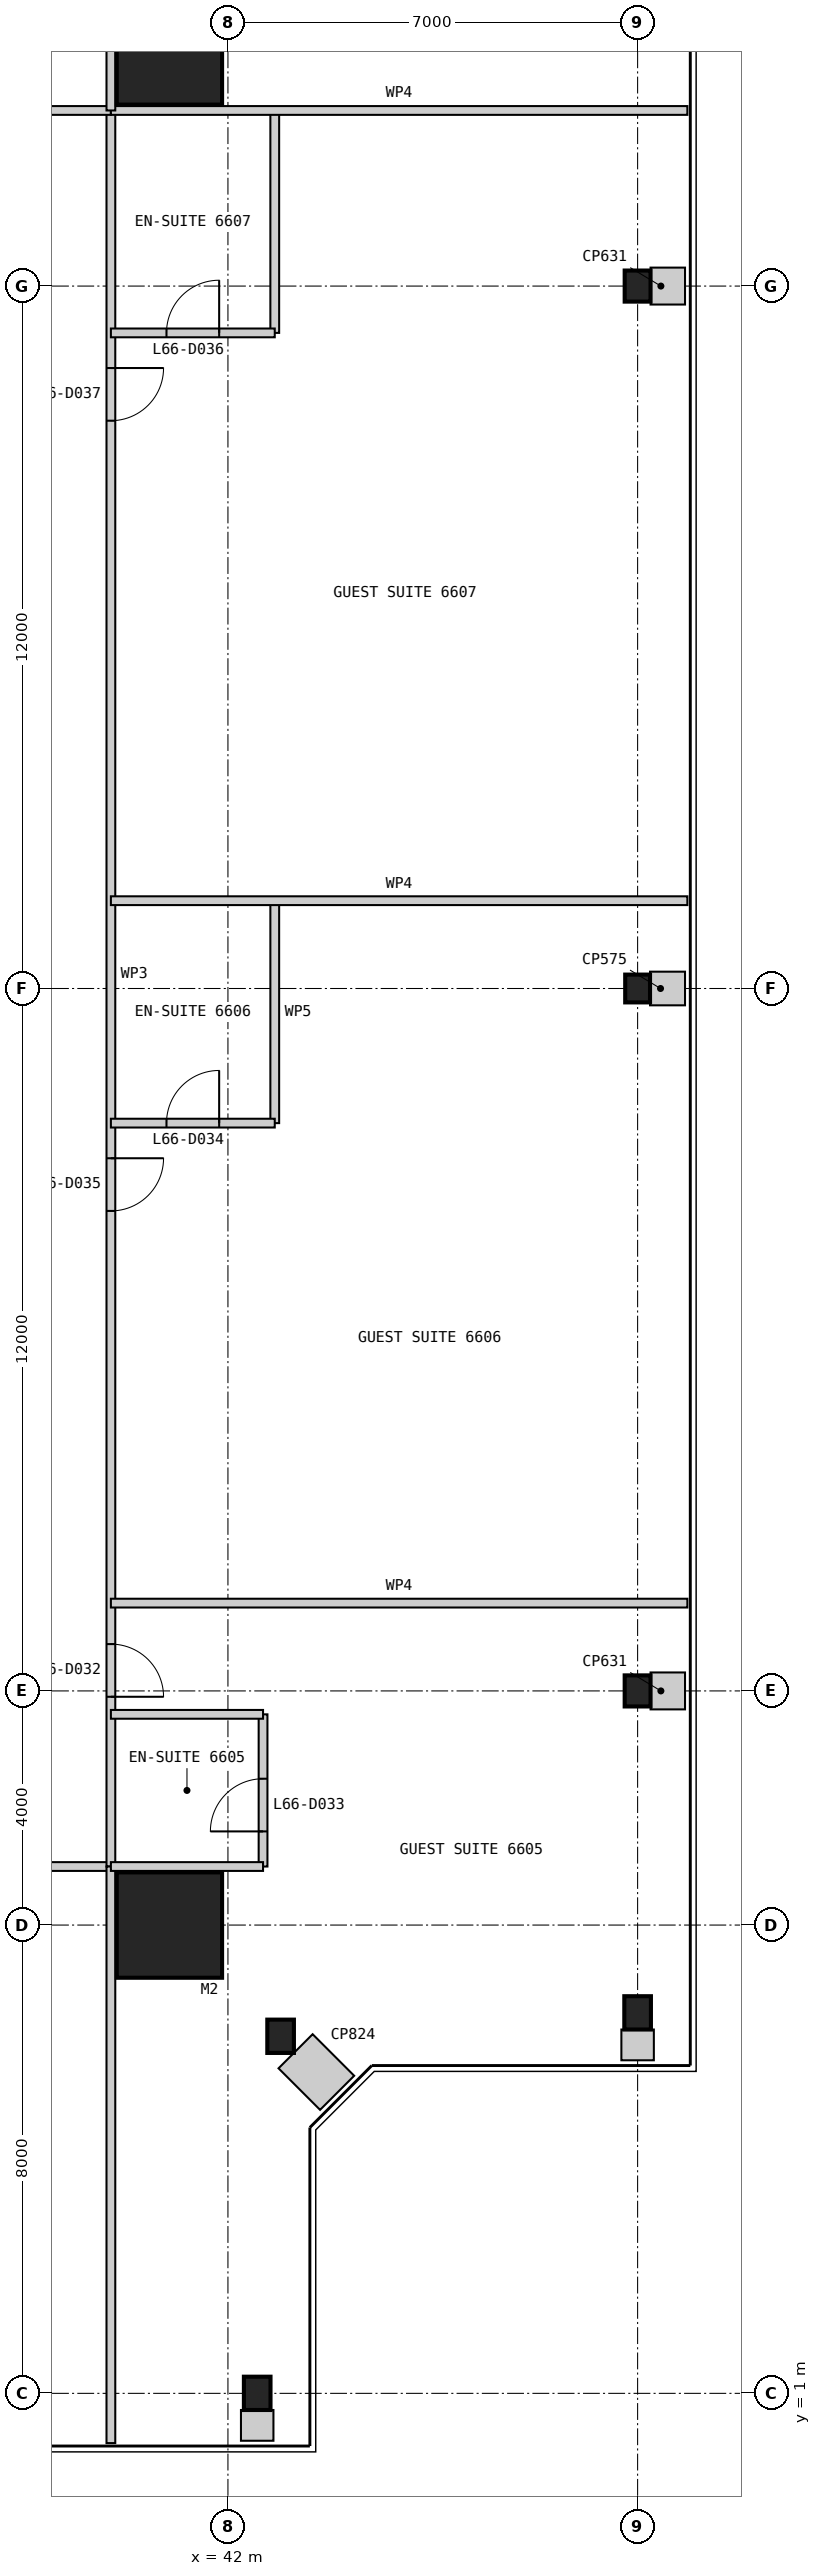
"""IFC4 building model, lengths in metres.
Left out: names, types, materials, properties, quantities, classifications, styles, units other than length and angle.
Written with IfcOpenShell. Run it as: python <this file> out.ifc"""

import sys

from ifc_helpers import new_model, si_unit, direction, frame, frame_2d, origin, origin_2d, place, context, subcontext, project, spatial, rectangle, i_section, extrude, element, fill, save


model = new_model("IFC4")
c1 = context("Model", 3, precision=1e-05, world=origin(), true_north=direction((0.0, 1.0)))
c2 = subcontext(c1, "Body", "Model", "MODEL_VIEW")
j1 = project(units=[si_unit("LENGTHUNIT", "METRE"), si_unit("PLANEANGLEUNIT", "RADIAN")], contexts=[c1])
p1 = place(None, origin())
s1 = spatial("IfcSite", under=j1, at=p1, CompositionType="ELEMENT")
p2 = place(p1, origin())
s2 = spatial("IfcBuilding", under=s1, at=p2, CompositionType="ELEMENT")
p3 = place(p2, frame((0.0, 0.0, 276.4)))
s3 = spatial("IfcBuildingStorey", under=s2, at=p3, CompositionType="ELEMENT", Elevation=276.4)
for number, where, z_axis, x_axis in (
    (1, (41.0, 9.0, 0.0), (0.0, 0.0, 1.0), (1.0, 0.0, 0.0)),
    (2, (41.0, 41.0, 0.0), (0.0, 0.0, 1.0), (1.0, 0.0, 0.0)),
):
    element("IfcColumn", number, at=place(p3, frame(where, z_axis=z_axis, x_axis=x_axis)), inside=s3, PredefinedType="COLUMN", context=c2, shape_type="SweptSolid", body=[
        extrude(rectangle(XDim=1.8, YDim=1.8, at=origin_2d()), origin(), (0.0, 0.0, 1.0), 3.4),
    ])
for number, where, z_axis, x_axis in (
    (3, (42.5, 1.0, 0.0), (0.0, 0.0, 1.0), (1.0, 0.0, 0.0)),
    (4, (42.9, 7.1, 0.0), (0.0, 0.0, 1.0), (1.0, 0.0, 0.0)),
    (5, (49.0, 7.5, 0.0), (0.0, 0.0, 1.0), (1.0, 0.0, 0.0)),
):
    element("IfcColumn", number, at=place(p3, frame(where, z_axis=z_axis, x_axis=x_axis)), inside=s3, PredefinedType="COLUMN", context=c2, shape_type="SweptSolid", body=[
        extrude(i_section(OverallWidth=0.455, OverallDepth=0.569, WebThickness=0.078, FlangeThickness=0.125, at=origin_2d()), origin(), (0.0, 0.0, 1.0), 3.4),
    ])
p4 = place(p3, frame((49.0, 13.0, 0.0), z_axis=(0.0, 0.0, 1.0), x_axis=(1.0, 0.0, 0.0)))
e6 = element("IfcColumn", 6, at=p4, inside=s3, PredefinedType="COLUMN", context=c2, shape_type="SweptSolid", body=[
    extrude(i_section(OverallWidth=0.442, OverallDepth=0.531, WebThickness=0.066, FlangeThickness=0.106, at=origin_2d()), origin(), (0.0, 0.0, 1.0), 3.4),
])
p5 = place(p3, frame((49.0, 25.0, 0.0), z_axis=(0.0, 0.0, 1.0), x_axis=(1.0, 0.0, 0.0)))
e7 = element("IfcColumn", 7, at=p5, inside=s3, PredefinedType="COLUMN", context=c2, shape_type="SweptSolid", body=[
    extrude(i_section(OverallWidth=0.424, OverallDepth=0.475, WebThickness=0.048, FlangeThickness=0.077, at=origin_2d()), origin(), (0.0, 0.0, 1.0), 3.4),
])
p6 = place(p3, frame((49.0, 37.0, 0.0), z_axis=(0.0, 0.0, 1.0), x_axis=(1.0, 0.0, 0.0)))
e8 = element("IfcColumn", 8, at=p6, inside=s3, PredefinedType="COLUMN", context=c2, shape_type="SweptSolid", body=[
    extrude(i_section(OverallWidth=0.442, OverallDepth=0.531, WebThickness=0.066, FlangeThickness=0.106, at=origin_2d()), origin(), (0.0, 0.0, 1.0), 3.4),
])
p7 = place(p3, frame((10.0, 10.0, 0.0), z_axis=(0.0, 0.0, 1.0), x_axis=(1.0, 0.0, 0.0)))
e9 = element("IfcWall", 9, at=p7, inside=s3, PredefinedType="PARTITIONING", context=c2, shape_type="SweptSolid", body=[
    extrude(rectangle(XDim=30.0, YDim=0.15, at=frame_2d((15.0, 0.0))), origin(), (0.0, 0.0, 1.0), 3.25),
])
p8 = place(p7, frame((2.9, 0.0, 0.0)))
e10 = element("IfcOpeningElement", 10, at=p8, cuts=e9, PredefinedType="OPENING", context=c2, shape_type="SweptSolid", body=[
    extrude(rectangle(XDim=0.9, YDim=2.1, at=frame_2d((0.45, 1.05))), frame((0.0, 0.085, 0.0), z_axis=(0.0, -1.0, 0.0), x_axis=(1.0, 0.0, 0.0)), (0.0, 0.0, 1.0), 0.17),
])
p9 = place(p7, frame((11.2, 0.0, 0.0)))
e11 = element("IfcOpeningElement", 11, at=p9, cuts=e9, PredefinedType="OPENING", context=c2, shape_type="SweptSolid", body=[
    extrude(rectangle(XDim=0.9, YDim=2.1, at=frame_2d((0.45, 1.05))), frame((0.0, 0.085, 0.0), z_axis=(0.0, -1.0, 0.0), x_axis=(1.0, 0.0, 0.0)), (0.0, 0.0, 1.0), 0.17),
])
p10 = place(p7, frame((17.6, 0.0, 0.0)))
e12 = element("IfcOpeningElement", 12, at=p10, cuts=e9, PredefinedType="OPENING", context=c2, shape_type="SweptSolid", body=[
    extrude(rectangle(XDim=0.9, YDim=2.1, at=frame_2d((0.45, 1.05))), frame((0.0, 0.085, 0.0), z_axis=(0.0, -1.0, 0.0), x_axis=(1.0, 0.0, 0.0)), (0.0, 0.0, 1.0), 0.17),
])
p11 = place(p7, frame((26.3, 0.0, 0.0)))
e13 = element("IfcOpeningElement", 13, at=p11, cuts=e9, PredefinedType="OPENING", context=c2, shape_type="SweptSolid", body=[
    extrude(rectangle(XDim=1.0, YDim=2.1, at=frame_2d((0.5, 1.05))), frame((0.0, 0.085, 0.0), z_axis=(0.0, -1.0, 0.0), x_axis=(1.0, 0.0, 0.0)), (0.0, 0.0, 1.0), 0.17),
])
p12 = place(p3, frame((40.0, 10.0, 0.0), z_axis=(0.0, 0.0, 1.0), x_axis=(0.0, 1.0, 0.0)))
e14 = element("IfcWall", 14, at=p12, inside=s3, PredefinedType="PARTITIONING", context=c2, shape_type="SweptSolid", body=[
    extrude(rectangle(XDim=30.0, YDim=0.15, at=frame_2d((15.0, 0.0))), origin(), (0.0, 0.0, 1.0), 2.638),
])
p13 = place(p12, frame((2.9, 0.0, 0.0)))
e15 = element("IfcOpeningElement", 15, at=p13, cuts=e14, PredefinedType="OPENING", context=c2, shape_type="SweptSolid", body=[
    extrude(rectangle(XDim=0.9, YDim=2.1, at=frame_2d((0.45, 1.05))), frame((0.0, 0.085, 0.0), z_axis=(0.0, -1.0, 0.0), x_axis=(1.0, 0.0, 0.0)), (0.0, 0.0, 1.0), 0.17),
])
p14 = place(p12, frame((11.2, 0.0, 0.0)))
e16 = element("IfcOpeningElement", 16, at=p14, cuts=e14, PredefinedType="OPENING", context=c2, shape_type="SweptSolid", body=[
    extrude(rectangle(XDim=0.9, YDim=2.1, at=frame_2d((0.45, 1.05))), frame((0.0, 0.085, 0.0), z_axis=(0.0, -1.0, 0.0), x_axis=(1.0, 0.0, 0.0)), (0.0, 0.0, 1.0), 0.17),
])
p15 = place(p12, frame((24.7, 0.0, 0.0)))
e17 = element("IfcOpeningElement", 17, at=p15, cuts=e14, PredefinedType="OPENING", context=c2, shape_type="SweptSolid", body=[
    extrude(rectangle(XDim=0.9, YDim=2.1, at=frame_2d((0.45, 1.05))), frame((0.0, 0.085, 0.0), z_axis=(0.0, -1.0, 0.0), x_axis=(1.0, 0.0, 0.0)), (0.0, 0.0, 1.0), 0.17),
])
p16 = place(p3, frame((40.0, 0.15, 0.0), z_axis=(0.0, 0.0, 1.0), x_axis=(0.0, 1.0, 0.0)))
e18 = element("IfcWall", 18, at=p16, inside=s3, PredefinedType="PARTITIONING", context=c2, shape_type="SweptSolid", body=[
    extrude(rectangle(XDim=9.85, YDim=0.15, at=frame_2d((4.925, 0.0))), origin(), (0.0, 0.0, 1.0), 3.25),
])
p17 = place(p3, frame((42.6, 10.0, 0.0), z_axis=(0.0, 0.0, 1.0), x_axis=(0.0, 1.0, 0.0)))
e19 = element("IfcWall", 19, at=p17, inside=s3, PredefinedType="PARTITIONING", context=c2, shape_type="SweptSolid", body=[
    extrude(rectangle(XDim=2.6, YDim=0.15, at=frame_2d((1.3, 0.0))), origin(), (0.0, 0.0, 1.0), 3.25),
])
p18 = place(p17, frame((0.6, 0.0, 0.0)))
e20 = element("IfcOpeningElement", 20, at=p18, cuts=e19, PredefinedType="OPENING", context=c2, shape_type="SweptSolid", body=[
    extrude(rectangle(XDim=0.9, YDim=2.1, at=frame_2d((0.45, 1.05))), frame((0.0, 0.085, 0.0), z_axis=(0.0, -1.0, 0.0), x_axis=(1.0, 0.0, 0.0)), (0.0, 0.0, 1.0), 0.17),
])
for number, where, z_axis, x_axis in (
    (21, (42.6, 10.0, 0.0), (0.0, 0.0, 1.0), (-1.0, 0.0, 0.0)),
    (22, (42.6, 12.6, 0.0), (0.0, 0.0, 1.0), (-1.0, 0.0, 0.0)),
):
    element("IfcWall", number, at=place(p3, frame(where, z_axis=z_axis, x_axis=x_axis)), inside=s3, PredefinedType="PARTITIONING", context=c2, shape_type="SweptSolid", body=[
        extrude(rectangle(XDim=2.6, YDim=0.15, at=frame_2d((1.3, 0.0))), origin(), (0.0, 0.0, 1.0), 3.25),
    ])
p19 = place(p3, frame((49.85, 14.5, 0.0), z_axis=(0.0, 0.0, 1.0), x_axis=(-1.0, 0.0, 0.0)))
e23 = element("IfcWall", 23, at=p19, inside=s3, PredefinedType="PARTITIONING", context=c2, shape_type="SweptSolid", body=[
    extrude(rectangle(XDim=9.85, YDim=0.15, at=frame_2d((4.925, 0.0))), origin(), (0.0, 0.0, 1.0), 3.25),
])
p20 = place(p3, frame((42.8, 22.7, 0.0), z_axis=(0.0, 0.0, 1.0), x_axis=(0.0, 1.0, 0.0)))
e24 = element("IfcWall", 24, at=p20, inside=s3, PredefinedType="PARTITIONING", context=c2, shape_type="SweptSolid", body=[
    extrude(rectangle(XDim=3.8, YDim=0.15, at=frame_2d((1.9, 0.0))), origin(), (0.0, 0.0, 1.0), 3.25),
])
p21 = place(p3, frame((42.8, 22.7, 0.0), z_axis=(0.0, 0.0, 1.0), x_axis=(-1.0, 0.0, 0.0)))
e25 = element("IfcWall", 25, at=p21, inside=s3, PredefinedType="PARTITIONING", context=c2, shape_type="SweptSolid", body=[
    extrude(rectangle(XDim=2.8, YDim=0.15, at=frame_2d((1.4, 0.0))), origin(), (0.0, 0.0, 1.0), 3.25),
])
p22 = place(p21, frame((0.95, 0.0, 0.0)))
e26 = element("IfcOpeningElement", 26, at=p22, cuts=e25, PredefinedType="OPENING", context=c2, shape_type="SweptSolid", body=[
    extrude(rectangle(XDim=0.9, YDim=2.1, at=frame_2d((0.45, 1.05))), frame((0.0, 0.085, 0.0), z_axis=(0.0, -1.0, 0.0), x_axis=(1.0, 0.0, 0.0)), (0.0, 0.0, 1.0), 0.17),
])
p23 = place(p3, frame((49.85, 26.5, 0.0), z_axis=(0.0, 0.0, 1.0), x_axis=(-1.0, 0.0, 0.0)))
e27 = element("IfcWall", 27, at=p23, inside=s3, PredefinedType="PARTITIONING", context=c2, shape_type="SweptSolid", body=[
    extrude(rectangle(XDim=9.85, YDim=0.15, at=frame_2d((4.925, 0.0))), origin(), (0.0, 0.0, 1.0), 3.25),
])
p24 = place(p3, frame((42.8, 36.2, 0.0), z_axis=(0.0, 0.0, 1.0), x_axis=(0.0, 1.0, 0.0)))
e28 = element("IfcWall", 28, at=p24, inside=s3, PredefinedType="PARTITIONING", context=c2, shape_type="SweptSolid", body=[
    extrude(rectangle(XDim=3.8, YDim=0.15, at=frame_2d((1.9, 0.0))), origin(), (0.0, 0.0, 1.0), 3.25),
])
p25 = place(p3, frame((42.8, 36.2, 0.0), z_axis=(0.0, 0.0, 1.0), x_axis=(-1.0, 0.0, 0.0)))
e29 = element("IfcWall", 29, at=p25, inside=s3, PredefinedType="PARTITIONING", context=c2, shape_type="SweptSolid", body=[
    extrude(rectangle(XDim=2.8, YDim=0.15, at=frame_2d((1.4, 0.0))), origin(), (0.0, 0.0, 1.0), 3.25),
])
p26 = place(p25, frame((0.95, 0.0, 0.0)))
e30 = element("IfcOpeningElement", 30, at=p26, cuts=e29, PredefinedType="OPENING", context=c2, shape_type="SweptSolid", body=[
    extrude(rectangle(XDim=0.9, YDim=2.1, at=frame_2d((0.45, 1.05))), frame((0.0, 0.085, 0.0), z_axis=(0.0, -1.0, 0.0), x_axis=(1.0, 0.0, 0.0)), (0.0, 0.0, 1.0), 0.17),
])
p27 = place(p3, frame((40.0, 40.0, 0.0), z_axis=(0.0, 0.0, 1.0), x_axis=(-1.0, 0.0, 0.0)))
e31 = element("IfcWall", 31, at=p27, inside=s3, PredefinedType="PARTITIONING", context=c2, shape_type="SweptSolid", body=[
    extrude(rectangle(XDim=30.0, YDim=0.15, at=frame_2d((15.0, 0.0))), origin(), (0.0, 0.0, 1.0), 3.25),
])
p28 = place(p27, frame((2.9, 0.0, 0.0)))
e32 = element("IfcOpeningElement", 32, at=p28, cuts=e31, PredefinedType="OPENING", context=c2, shape_type="SweptSolid", body=[
    extrude(rectangle(XDim=0.9, YDim=2.1, at=frame_2d((0.45, 1.05))), frame((0.0, 0.085, 0.0), z_axis=(0.0, -1.0, 0.0), x_axis=(1.0, 0.0, 0.0)), (0.0, 0.0, 1.0), 0.17),
])
p29 = place(p27, frame((11.2, 0.0, 0.0)))
e33 = element("IfcOpeningElement", 33, at=p29, cuts=e31, PredefinedType="OPENING", context=c2, shape_type="SweptSolid", body=[
    extrude(rectangle(XDim=0.9, YDim=2.1, at=frame_2d((0.45, 1.05))), frame((0.0, 0.085, 0.0), z_axis=(0.0, -1.0, 0.0), x_axis=(1.0, 0.0, 0.0)), (0.0, 0.0, 1.0), 0.17),
])
p30 = place(p27, frame((24.7, 0.0, 0.0)))
e34 = element("IfcOpeningElement", 34, at=p30, cuts=e31, PredefinedType="OPENING", context=c2, shape_type="SweptSolid", body=[
    extrude(rectangle(XDim=0.9, YDim=2.1, at=frame_2d((0.45, 1.05))), frame((0.0, 0.085, 0.0), z_axis=(0.0, -1.0, 0.0), x_axis=(1.0, 0.0, 0.0)), (0.0, 0.0, 1.0), 0.17),
])
p31 = place(p3, frame((49.85, 40.0, 0.0), z_axis=(0.0, 0.0, 1.0), x_axis=(-1.0, 0.0, 0.0)))
e35 = element("IfcWall", 35, at=p31, inside=s3, PredefinedType="PARTITIONING", context=c2, shape_type="SweptSolid", body=[
    extrude(rectangle(XDim=9.85, YDim=0.15, at=frame_2d((4.925, 0.0))), origin(), (0.0, 0.0, 1.0), 3.25),
])
p32 = place(p3, frame((40.0, 42.6, 0.0), z_axis=(0.0, 0.0, 1.0), x_axis=(0.0, -1.0, 0.0)))
e36 = element("IfcWall", 36, at=p32, inside=s3, PredefinedType="PARTITIONING", context=c2, shape_type="SweptSolid", body=[
    extrude(rectangle(XDim=2.6, YDim=0.15, at=frame_2d((1.3, 0.0))), origin(), (0.0, 0.0, 1.0), 3.25),
])
p33 = place(p3, frame((42.5, 0.19, 0.0), z_axis=(0.0, 0.0, 1.0), x_axis=(0.0, 1.0, 0.0)))
e37 = element("IfcWall", 37, at=p33, inside=s3, PredefinedType="PARTITIONING", context=c2, shape_type="SweptSolid", body=[
    extrude(rectangle(XDim=0.526, YDim=0.555, at=frame_2d((0.263, 0.0))), origin(), (0.0, 0.0, 1.0), 3.25),
])
p34 = place(p3, frame((43.866, 6.134, 0.0), z_axis=(0.0, 0.0, 1.0), x_axis=(-0.707106781187, 0.707106781187, 0.0)))
e38 = element("IfcWall", 38, at=p34, inside=s3, PredefinedType="PARTITIONING", context=c2, shape_type="SweptSolid", body=[
    extrude(rectangle(XDim=1.004, YDim=0.824, at=frame_2d((0.502, 0.0))), origin(), (0.0, 0.0, 1.0), 3.25),
])
p35 = place(p3, frame((49.0, 6.69, 0.0), z_axis=(0.0, 0.0, 1.0), x_axis=(0.0, 1.0, 0.0)))
e39 = element("IfcWall", 39, at=p35, inside=s3, PredefinedType="PARTITIONING", context=c2, shape_type="SweptSolid", body=[
    extrude(rectangle(XDim=0.526, YDim=0.555, at=frame_2d((0.263, 0.0))), origin(), (0.0, 0.0, 1.0), 3.25),
])
p36 = place(p3, frame((49.81, 13.0, 0.0), z_axis=(0.0, 0.0, 1.0), x_axis=(-1.0, 0.0, 0.0)))
e40 = element("IfcWall", 40, at=p36, inside=s3, PredefinedType="PARTITIONING", context=c2, shape_type="SweptSolid", body=[
    extrude(rectangle(XDim=0.589, YDim=0.631, at=frame_2d((0.294, 0.0))), origin(), (0.0, 0.0, 1.0), 3.25),
])
p37 = place(p3, frame((49.81, 25.0, 0.0), z_axis=(0.0, 0.0, 1.0), x_axis=(-1.0, 0.0, 0.0)))
e41 = element("IfcWall", 41, at=p37, inside=s3, PredefinedType="PARTITIONING", context=c2, shape_type="SweptSolid", body=[
    extrude(rectangle(XDim=0.598, YDim=0.575, at=frame_2d((0.299, 0.0))), origin(), (0.0, 0.0, 1.0), 3.25),
])
p38 = place(p3, frame((49.81, 37.0, 0.0), z_axis=(0.0, 0.0, 1.0), x_axis=(-1.0, 0.0, 0.0)))
e42 = element("IfcWall", 42, at=p38, inside=s3, PredefinedType="PARTITIONING", context=c2, shape_type="SweptSolid", body=[
    extrude(rectangle(XDim=0.589, YDim=0.631, at=frame_2d((0.294, 0.0))), origin(), (0.0, 0.0, 1.0), 3.25),
])
p39 = place(p13, frame((0.9, 0.0, 0.0), z_axis=(0.0, 0.0, 1.0), x_axis=(-1.0, 0.0, 0.0)))
e43 = element("IfcDoor", 43, at=p39, inside=s3, OperationType="SINGLE_SWING_RIGHT", PredefinedType="DOOR", context=c2, shape_type="SweptSolid", body=[
    extrude(rectangle(XDim=0.9, YDim=2.1, at=frame_2d((0.45, 1.05))), frame((0.0, 0.025, 0.0), z_axis=(0.0, -1.0, 0.0), x_axis=(1.0, 0.0, 0.0)), (0.0, 0.0, 1.0), 0.05),
])
fill(e15, e43)
p40 = place(p18, origin())
e44 = element("IfcDoor", 44, at=p40, inside=s3, OperationType="SINGLE_SWING_LEFT", PredefinedType="DOOR", context=c2, shape_type="SweptSolid", body=[
    extrude(rectangle(XDim=0.9, YDim=2.1, at=frame_2d((0.45, 1.05))), frame((0.0, 0.025, 0.0), z_axis=(0.0, -1.0, 0.0), x_axis=(1.0, 0.0, 0.0)), (0.0, 0.0, 1.0), 0.05),
])
fill(e20, e44)
p41 = place(p22, frame((0.9, 0.0, 0.0), z_axis=(0.0, 0.0, 1.0), x_axis=(-1.0, 0.0, 0.0)))
e45 = element("IfcDoor", 45, at=p41, inside=s3, OperationType="SINGLE_SWING_RIGHT", PredefinedType="DOOR", context=c2, shape_type="SweptSolid", body=[
    extrude(rectangle(XDim=0.9, YDim=2.1, at=frame_2d((0.45, 1.05))), frame((0.0, 0.025, 0.0), z_axis=(0.0, -1.0, 0.0), x_axis=(1.0, 0.0, 0.0)), (0.0, 0.0, 1.0), 0.05),
])
fill(e26, e45)
p42 = place(p14, frame((0.9, 0.0, 0.0), z_axis=(0.0, 0.0, 1.0), x_axis=(-1.0, 0.0, 0.0)))
e46 = element("IfcDoor", 46, at=p42, inside=s3, OperationType="SINGLE_SWING_LEFT", PredefinedType="DOOR", context=c2, shape_type="SweptSolid", body=[
    extrude(rectangle(XDim=0.9, YDim=2.1, at=frame_2d((0.45, 1.05))), frame((0.0, 0.025, 0.0), z_axis=(0.0, -1.0, 0.0), x_axis=(1.0, 0.0, 0.0)), (0.0, 0.0, 1.0), 0.05),
])
fill(e16, e46)
p43 = place(p26, frame((0.9, 0.0, 0.0), z_axis=(0.0, 0.0, 1.0), x_axis=(-1.0, 0.0, 0.0)))
e47 = element("IfcDoor", 47, at=p43, inside=s3, OperationType="SINGLE_SWING_RIGHT", PredefinedType="DOOR", context=c2, shape_type="SweptSolid", body=[
    extrude(rectangle(XDim=0.9, YDim=2.1, at=frame_2d((0.45, 1.05))), frame((0.0, 0.025, 0.0), z_axis=(0.0, -1.0, 0.0), x_axis=(1.0, 0.0, 0.0)), (0.0, 0.0, 1.0), 0.05),
])
fill(e30, e47)
p44 = place(p15, frame((0.9, 0.0, 0.0), z_axis=(0.0, 0.0, 1.0), x_axis=(-1.0, 0.0, 0.0)))
e48 = element("IfcDoor", 48, at=p44, inside=s3, OperationType="SINGLE_SWING_LEFT", PredefinedType="DOOR", context=c2, shape_type="SweptSolid", body=[
    extrude(rectangle(XDim=0.9, YDim=2.1, at=frame_2d((0.45, 1.05))), frame((0.0, 0.025, 0.0), z_axis=(0.0, -1.0, 0.0), x_axis=(1.0, 0.0, 0.0)), (0.0, 0.0, 1.0), 0.05),
])
fill(e17, e48)
save(model, sys.argv[1])
